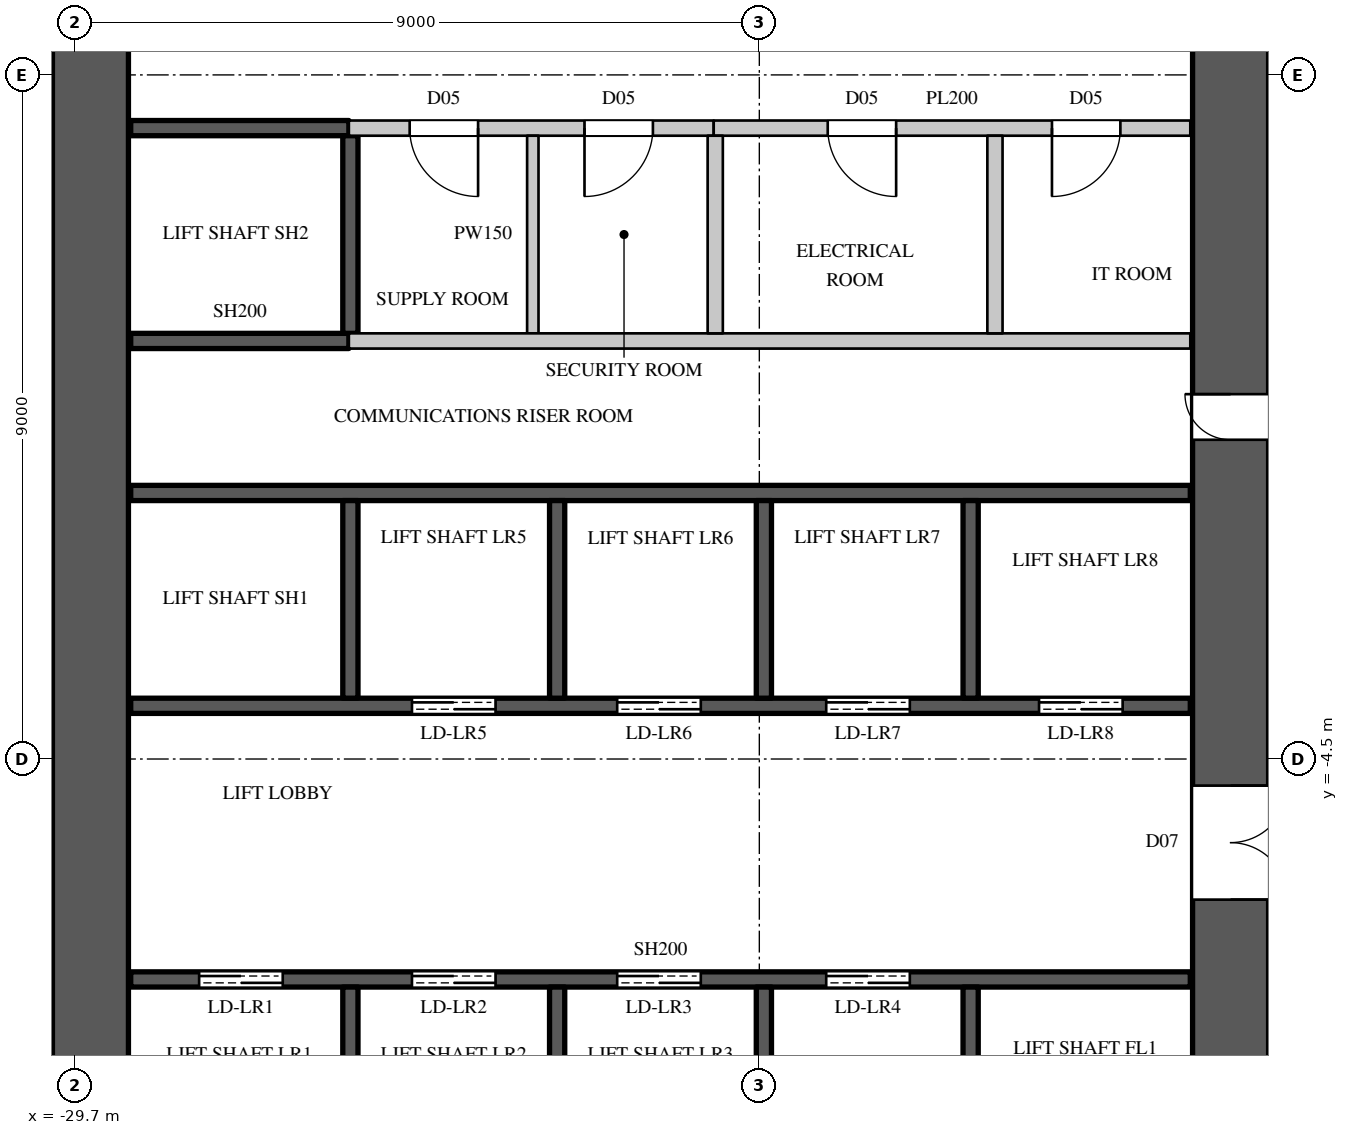
"""IFC4 building model, lengths in metres.
Left out: names, types, materials, properties, quantities, classifications, styles, units other than length and angle.
Written with IfcOpenShell. Run it as: python <this file> out.ifc"""

import sys

from ifc_helpers import new_model, si_unit, direction, frame, frame_2d, origin, place, context, subcontext, project, spatial, rectangle, extrude, element, fill, save


model = new_model("IFC4")
c1 = context("Model", 3, precision=1e-05, world=origin(), true_north=direction((0.0, 1.0)))
c2 = subcontext(c1, "Body", "Model", "MODEL_VIEW")
j1 = project(units=[si_unit("LENGTHUNIT", "METRE"), si_unit("PLANEANGLEUNIT", "RADIAN")], contexts=[c1])
p1 = place(None, origin())
s1 = spatial("IfcSite", under=j1, at=p1, CompositionType="ELEMENT")
p2 = place(p1, origin())
s2 = spatial("IfcBuilding", under=s1, at=p2, CompositionType="ELEMENT")
p3 = place(p2, frame((0.0, 0.0, 127.5)))
s3 = spatial("IfcBuildingStorey", under=s2, at=p3, CompositionType="ELEMENT", Elevation=127.5)
p4 = place(p3, frame((-14.5, -14.8, 0.0), z_axis=(0.0, 0.0, 1.0), x_axis=(0.0, 1.0, 0.0)))
e1 = element("IfcWall", 1, at=p4, inside=s3, PredefinedType="SHEAR", context=c2, shape_type="SweptSolid", body=[
    extrude(rectangle(XDim=29.6, YDim=1.0, at=frame_2d((14.8, 0.0))), origin(), (0.0, 0.0, 1.0), 3.6),
])
p5 = place(p4, frame((8.45, 0.0, 0.0)))
e2 = element("IfcOpeningElement", 2, at=p5, cuts=e1, PredefinedType="OPENING", context=c2, shape_type="SweptSolid", body=[
    extrude(rectangle(XDim=1.5, YDim=2.4, at=frame_2d((0.75, 1.2))), frame((0.0, 0.51, 0.0), z_axis=(0.0, -1.0, 0.0), x_axis=(1.0, 0.0, 0.0)), (0.0, 0.0, 1.0), 1.02),
])
p6 = place(p4, frame((19.65, 0.0, 0.0)))
e3 = element("IfcOpeningElement", 3, at=p6, cuts=e1, PredefinedType="OPENING", context=c2, shape_type="SweptSolid", body=[
    extrude(rectangle(XDim=1.5, YDim=2.4, at=frame_2d((0.75, 1.2))), frame((0.0, 0.51, 0.0), z_axis=(0.0, -1.0, 0.0), x_axis=(1.0, 0.0, 0.0)), (0.0, 0.0, 1.0), 1.02),
])
p7 = place(p4, frame((14.5, 0.0, 0.0)))
e4 = element("IfcOpeningElement", 4, at=p7, cuts=e1, PredefinedType="OPENING", context=c2, shape_type="SweptSolid", body=[
    extrude(rectangle(XDim=0.6, YDim=2.0, at=frame_2d((0.3, 1.0))), frame((0.0, 0.51, 0.0), z_axis=(0.0, -1.0, 0.0), x_axis=(1.0, 0.0, 0.0)), (0.0, 0.0, 1.0), 1.02),
])
p8 = place(p3, frame((-29.5, -10.2, 0.0), z_axis=(0.0, 0.0, 1.0), x_axis=(0.0, 1.0, 0.0)))
e5 = element("IfcWall", 5, at=p8, inside=s3, PredefinedType="SHEAR", context=c2, shape_type="SweptSolid", body=[
    extrude(rectangle(XDim=20.4, YDim=1.0, at=frame_2d((10.2, 0.0))), origin(), (0.0, 0.0, 1.0), 3.6),
])
p9 = place(p3, frame((-26.1, 3.8, 0.0), z_axis=(0.0, 0.0, 1.0), x_axis=(1.0, 0.0, 0.0)))
e6 = element("IfcWall", 6, at=p9, inside=s3, PredefinedType="PARTITIONING", context=c2, shape_type="SweptSolid", body=[
    extrude(rectangle(XDim=4.8, YDim=0.2, at=frame_2d((2.4, 0.0))), origin(), (0.0, 0.0, 1.0), 3.3),
])
p10 = place(p9, frame((0.8, 0.0, 0.0)))
e7 = element("IfcOpeningElement", 7, at=p10, cuts=e6, PredefinedType="OPENING", context=c2, shape_type="SweptSolid", body=[
    extrude(rectangle(XDim=0.9, YDim=2.2, at=frame_2d((0.45, 1.1))), frame((0.0, 0.11, 0.0), z_axis=(0.0, -1.0, 0.0), x_axis=(1.0, 0.0, 0.0)), (0.0, 0.0, 1.0), 0.22),
])
p11 = place(p9, frame((3.1, 0.0, 0.0)))
e8 = element("IfcOpeningElement", 8, at=p11, cuts=e6, PredefinedType="OPENING", context=c2, shape_type="SweptSolid", body=[
    extrude(rectangle(XDim=0.9, YDim=2.2, at=frame_2d((0.45, 1.1))), frame((0.0, 0.11, 0.0), z_axis=(0.0, -1.0, 0.0), x_axis=(1.0, 0.0, 0.0)), (0.0, 0.0, 1.0), 0.22),
])
p12 = place(p3, frame((-23.68, 1.1, 0.0), z_axis=(0.0, 0.0, 1.0), x_axis=(0.0, 1.0, 0.0)))
e9 = element("IfcWall", 9, at=p12, inside=s3, PredefinedType="PARTITIONING", context=c2, shape_type="SweptSolid", body=[
    extrude(rectangle(XDim=2.6, YDim=0.15, at=frame_2d((1.3, 0.0))), origin(), (0.0, 0.0, 1.0), 3.3),
])
p13 = place(p3, frame((-26.1, 1.0, 0.0), z_axis=(0.0, 0.0, 1.0), x_axis=(1.0, 0.0, 0.0)))
e10 = element("IfcWall", 10, at=p13, inside=s3, PredefinedType="PARTITIONING", context=c2, shape_type="SweptSolid", body=[
    extrude(rectangle(XDim=11.07, YDim=0.2, at=frame_2d((5.535, 0.0))), origin(), (0.0, 0.0, 1.0), 3.3),
])
p14 = place(p3, frame((-21.3, 3.8, 0.0), z_axis=(0.0, 0.0, 1.0), x_axis=(1.0, 0.0, 0.0)))
e11 = element("IfcWall", 11, at=p14, inside=s3, PredefinedType="PARTITIONING", context=c2, shape_type="SweptSolid", body=[
    extrude(rectangle(XDim=6.27, YDim=0.2, at=frame_2d((3.135, 0.0))), origin(), (0.0, 0.0, 1.0), 3.3),
])
p15 = place(p14, frame((1.5, 0.0, 0.0)))
e12 = element("IfcOpeningElement", 12, at=p15, cuts=e11, PredefinedType="OPENING", context=c2, shape_type="SweptSolid", body=[
    extrude(rectangle(XDim=0.9, YDim=2.2, at=frame_2d((0.45, 1.1))), frame((0.0, 0.11, 0.0), z_axis=(0.0, -1.0, 0.0), x_axis=(1.0, 0.0, 0.0)), (0.0, 0.0, 1.0), 0.22),
])
p16 = place(p14, frame((4.45, 0.0, 0.0)))
e13 = element("IfcOpeningElement", 13, at=p16, cuts=e11, PredefinedType="OPENING", context=c2, shape_type="SweptSolid", body=[
    extrude(rectangle(XDim=0.9, YDim=2.2, at=frame_2d((0.45, 1.1))), frame((0.0, 0.11, 0.0), z_axis=(0.0, -1.0, 0.0), x_axis=(1.0, 0.0, 0.0)), (0.0, 0.0, 1.0), 0.22),
])
for number, where, z_axis, x_axis in (
    (14, (-21.28, 1.1, 0.0), (0.0, 0.0, 1.0), (0.0, 1.0, 0.0)),
    (15, (-17.6, 1.1, 0.0), (0.0, 0.0, 1.0), (0.0, 1.0, 0.0)),
):
    element("IfcWall", number, at=place(p3, frame(where, z_axis=z_axis, x_axis=x_axis)), inside=s3, PredefinedType="PARTITIONING", context=c2, shape_type="SweptSolid", body=[
        extrude(rectangle(XDim=2.6, YDim=0.2, at=frame_2d((1.3, 0.0))), origin(), (0.0, 0.0, 1.0), 3.3),
    ])
p17 = place(p3, frame((-28.97, -7.4, 0.0), z_axis=(0.0, 0.0, 1.0), x_axis=(1.0, 0.0, 0.0)))
e16 = element("IfcWall", 16, at=p17, inside=s3, PredefinedType="SHEAR", context=c2, shape_type="SweptSolid", body=[
    extrude(rectangle(XDim=13.94, YDim=0.2, at=frame_2d((6.97, 0.0))), origin(), (0.0, 0.0, 1.0), 3.3),
])
p18 = place(p17, frame((0.9, 0.0, 0.0)))
e17 = element("IfcOpeningElement", 17, at=p18, cuts=e16, PredefinedType="OPENING", context=c2, shape_type="SweptSolid", body=[
    extrude(rectangle(XDim=1.1, YDim=2.2, at=frame_2d((0.55, 1.1))), frame((0.0, 0.11, 0.0), z_axis=(0.0, -1.0, 0.0), x_axis=(1.0, 0.0, 0.0)), (0.0, 0.0, 1.0), 0.22),
])
p19 = place(p17, frame((3.7, 0.0, 0.0)))
e18 = element("IfcOpeningElement", 18, at=p19, cuts=e16, PredefinedType="OPENING", context=c2, shape_type="SweptSolid", body=[
    extrude(rectangle(XDim=1.1, YDim=2.2, at=frame_2d((0.55, 1.1))), frame((0.0, 0.11, 0.0), z_axis=(0.0, -1.0, 0.0), x_axis=(1.0, 0.0, 0.0)), (0.0, 0.0, 1.0), 0.22),
])
p20 = place(p17, frame((6.4, 0.0, 0.0)))
e19 = element("IfcOpeningElement", 19, at=p20, cuts=e16, PredefinedType="OPENING", context=c2, shape_type="SweptSolid", body=[
    extrude(rectangle(XDim=1.1, YDim=2.2, at=frame_2d((0.55, 1.1))), frame((0.0, 0.11, 0.0), z_axis=(0.0, -1.0, 0.0), x_axis=(1.0, 0.0, 0.0)), (0.0, 0.0, 1.0), 0.22),
])
p21 = place(p17, frame((9.15, 0.0, 0.0)))
e20 = element("IfcOpeningElement", 20, at=p21, cuts=e16, PredefinedType="OPENING", context=c2, shape_type="SweptSolid", body=[
    extrude(rectangle(XDim=1.1, YDim=2.2, at=frame_2d((0.55, 1.1))), frame((0.0, 0.11, 0.0), z_axis=(0.0, -1.0, 0.0), x_axis=(1.0, 0.0, 0.0)), (0.0, 0.0, 1.0), 0.22),
])
p22 = place(p3, frame((-28.97, -3.8, 0.0), z_axis=(0.0, 0.0, 1.0), x_axis=(1.0, 0.0, 0.0)))
e21 = element("IfcWall", 21, at=p22, inside=s3, PredefinedType="SHEAR", context=c2, shape_type="SweptSolid", body=[
    extrude(rectangle(XDim=13.94, YDim=0.2, at=frame_2d((6.97, 0.0))), origin(), (0.0, 0.0, 1.0), 3.3),
])
p23 = place(p22, frame((3.7, 0.0, 0.0)))
e22 = element("IfcOpeningElement", 22, at=p23, cuts=e21, PredefinedType="OPENING", context=c2, shape_type="SweptSolid", body=[
    extrude(rectangle(XDim=1.1, YDim=2.2, at=frame_2d((0.55, 1.1))), frame((0.0, 0.11, 0.0), z_axis=(0.0, -1.0, 0.0), x_axis=(1.0, 0.0, 0.0)), (0.0, 0.0, 1.0), 0.22),
])
p24 = place(p22, frame((6.4, 0.0, 0.0)))
e23 = element("IfcOpeningElement", 23, at=p24, cuts=e21, PredefinedType="OPENING", context=c2, shape_type="SweptSolid", body=[
    extrude(rectangle(XDim=1.1, YDim=2.2, at=frame_2d((0.55, 1.1))), frame((0.0, 0.11, 0.0), z_axis=(0.0, -1.0, 0.0), x_axis=(1.0, 0.0, 0.0)), (0.0, 0.0, 1.0), 0.22),
])
p25 = place(p22, frame((9.15, 0.0, 0.0)))
e24 = element("IfcOpeningElement", 24, at=p25, cuts=e21, PredefinedType="OPENING", context=c2, shape_type="SweptSolid", body=[
    extrude(rectangle(XDim=1.1, YDim=2.2, at=frame_2d((0.55, 1.1))), frame((0.0, 0.11, 0.0), z_axis=(0.0, -1.0, 0.0), x_axis=(1.0, 0.0, 0.0)), (0.0, 0.0, 1.0), 0.22),
])
p26 = place(p22, frame((11.95, 0.0, 0.0)))
e25 = element("IfcOpeningElement", 25, at=p26, cuts=e21, PredefinedType="OPENING", context=c2, shape_type="SweptSolid", body=[
    extrude(rectangle(XDim=1.1, YDim=2.2, at=frame_2d((0.55, 1.1))), frame((0.0, 0.11, 0.0), z_axis=(0.0, -1.0, 0.0), x_axis=(1.0, 0.0, 0.0)), (0.0, 0.0, 1.0), 0.22),
])
p27 = place(p3, frame((-28.97, -1.0, 0.0), z_axis=(0.0, 0.0, 1.0), x_axis=(1.0, 0.0, 0.0)))
e26 = element("IfcWall", 26, at=p27, inside=s3, PredefinedType="SHEAR", context=c2, shape_type="SweptSolid", body=[
    extrude(rectangle(XDim=13.94, YDim=0.2, at=frame_2d((6.97, 0.0))), origin(), (0.0, 0.0, 1.0), 3.3),
])
for number, where, z_axis, x_axis in (
    (27, (-28.97, 1.0, 0.0), (0.0, 0.0, 1.0), (1.0, 0.0, 0.0)),
    (28, (-28.97, 3.8, 0.0), (0.0, 0.0, 1.0), (1.0, 0.0, 0.0)),
):
    element("IfcWall", number, at=place(p3, frame(where, z_axis=z_axis, x_axis=x_axis)), inside=s3, PredefinedType="SHEAR", context=c2, shape_type="SweptSolid", body=[
        extrude(rectangle(XDim=2.87, YDim=0.2, at=frame_2d((1.435, 0.0))), origin(), (0.0, 0.0, 1.0), 3.3),
    ])
p28 = place(p3, frame((-26.08, -10.075, 0.0), z_axis=(0.0, 0.0, 1.0), x_axis=(0.0, 1.0, 0.0)))
e29 = element("IfcWall", 29, at=p28, inside=s3, PredefinedType="SHEAR", context=c2, shape_type="SweptSolid", body=[
    extrude(rectangle(XDim=2.575, YDim=0.2, at=frame_2d((1.288, 0.0))), origin(), (0.0, 0.0, 1.0), 3.6),
])
p29 = place(p3, frame((-26.08, -3.7, 0.0), z_axis=(0.0, 0.0, 1.0), x_axis=(0.0, 1.0, 0.0)))
e30 = element("IfcWall", 30, at=p29, inside=s3, PredefinedType="SHEAR", context=c2, shape_type="SweptSolid", body=[
    extrude(rectangle(XDim=2.6, YDim=0.2, at=frame_2d((1.3, 0.0))), origin(), (0.0, 0.0, 1.0), 3.6),
])
p30 = place(p3, frame((-26.08, 1.1, 0.0), z_axis=(0.0, 0.0, 1.0), x_axis=(0.0, 1.0, 0.0)))
e31 = element("IfcWall", 31, at=p30, inside=s3, PredefinedType="SHEAR", context=c2, shape_type="SweptSolid", body=[
    extrude(rectangle(XDim=2.6, YDim=0.2, at=frame_2d((1.3, 0.0))), origin(), (0.0, 0.0, 1.0), 3.3),
])
p31 = place(p3, frame((-23.36, -10.075, 0.0), z_axis=(0.0, 0.0, 1.0), x_axis=(0.0, 1.0, 0.0)))
e32 = element("IfcWall", 32, at=p31, inside=s3, PredefinedType="SHEAR", context=c2, shape_type="SweptSolid", body=[
    extrude(rectangle(XDim=2.575, YDim=0.2, at=frame_2d((1.288, 0.0))), origin(), (0.0, 0.0, 1.0), 3.6),
])
p32 = place(p3, frame((-23.36, -3.7, 0.0), z_axis=(0.0, 0.0, 1.0), x_axis=(0.0, 1.0, 0.0)))
e33 = element("IfcWall", 33, at=p32, inside=s3, PredefinedType="SHEAR", context=c2, shape_type="SweptSolid", body=[
    extrude(rectangle(XDim=2.6, YDim=0.2, at=frame_2d((1.3, 0.0))), origin(), (0.0, 0.0, 1.0), 3.6),
])
p33 = place(p3, frame((-20.64, -10.075, 0.0), z_axis=(0.0, 0.0, 1.0), x_axis=(0.0, 1.0, 0.0)))
e34 = element("IfcWall", 34, at=p33, inside=s3, PredefinedType="SHEAR", context=c2, shape_type="SweptSolid", body=[
    extrude(rectangle(XDim=2.575, YDim=0.2, at=frame_2d((1.288, 0.0))), origin(), (0.0, 0.0, 1.0), 3.6),
])
p34 = place(p3, frame((-20.64, -3.7, 0.0), z_axis=(0.0, 0.0, 1.0), x_axis=(0.0, 1.0, 0.0)))
e35 = element("IfcWall", 35, at=p34, inside=s3, PredefinedType="SHEAR", context=c2, shape_type="SweptSolid", body=[
    extrude(rectangle(XDim=2.6, YDim=0.2, at=frame_2d((1.3, 0.0))), origin(), (0.0, 0.0, 1.0), 3.6),
])
p35 = place(p3, frame((-17.92, -10.1, 0.0), z_axis=(0.0, 0.0, 1.0), x_axis=(0.0, 1.0, 0.0)))
e36 = element("IfcWall", 36, at=p35, inside=s3, PredefinedType="SHEAR", context=c2, shape_type="SweptSolid", body=[
    extrude(rectangle(XDim=2.6, YDim=0.2, at=frame_2d((1.3, 0.0))), origin(), (0.0, 0.0, 1.0), 3.6),
])
p36 = place(p3, frame((-17.92, -3.7, 0.0), z_axis=(0.0, 0.0, 1.0), x_axis=(0.0, 1.0, 0.0)))
e37 = element("IfcWall", 37, at=p36, inside=s3, PredefinedType="SHEAR", context=c2, shape_type="SweptSolid", body=[
    extrude(rectangle(XDim=2.6, YDim=0.2, at=frame_2d((1.3, 0.0))), origin(), (0.0, 0.0, 1.0), 3.6),
])
p37 = place(p10, origin())
e38 = element("IfcDoor", 38, at=p37, inside=s3, OperationType="SINGLE_SWING_LEFT", PredefinedType="DOOR", context=c2, shape_type="SweptSolid", body=[
    extrude(rectangle(XDim=0.9, YDim=2.2, at=frame_2d((0.45, 1.1))), frame((0.0, 0.025, 0.0), z_axis=(0.0, -1.0, 0.0), x_axis=(1.0, 0.0, 0.0)), (0.0, 0.0, 1.0), 0.05),
])
fill(e7, e38)
p38 = place(p11, origin())
e39 = element("IfcDoor", 39, at=p38, inside=s3, OperationType="SINGLE_SWING_RIGHT", PredefinedType="DOOR", context=c2, shape_type="SweptSolid", body=[
    extrude(rectangle(XDim=0.9, YDim=2.2, at=frame_2d((0.45, 1.1))), frame((0.0, 0.025, 0.0), z_axis=(0.0, -1.0, 0.0), x_axis=(1.0, 0.0, 0.0)), (0.0, 0.0, 1.0), 0.05),
])
fill(e8, e39)
p39 = place(p15, origin())
e40 = element("IfcDoor", 40, at=p39, inside=s3, OperationType="SINGLE_SWING_LEFT", PredefinedType="DOOR", context=c2, shape_type="SweptSolid", body=[
    extrude(rectangle(XDim=0.9, YDim=2.2, at=frame_2d((0.45, 1.1))), frame((0.0, 0.025, 0.0), z_axis=(0.0, -1.0, 0.0), x_axis=(1.0, 0.0, 0.0)), (0.0, 0.0, 1.0), 0.05),
])
fill(e12, e40)
p40 = place(p16, origin())
e41 = element("IfcDoor", 41, at=p40, inside=s3, OperationType="SINGLE_SWING_RIGHT", PredefinedType="DOOR", context=c2, shape_type="SweptSolid", body=[
    extrude(rectangle(XDim=0.9, YDim=2.2, at=frame_2d((0.45, 1.1))), frame((0.0, 0.025, 0.0), z_axis=(0.0, -1.0, 0.0), x_axis=(1.0, 0.0, 0.0)), (0.0, 0.0, 1.0), 0.05),
])
fill(e13, e41)
p41 = place(p18, origin())
e42 = element("IfcDoor", 42, at=p41, inside=s3, OperationType="DOUBLE_DOOR_SLIDING", PredefinedType="DOOR", context=c2, shape_type="SweptSolid", body=[
    extrude(rectangle(XDim=1.1, YDim=2.2, at=frame_2d((0.55, 1.1))), frame((0.0, 0.025, 0.0), z_axis=(0.0, -1.0, 0.0), x_axis=(1.0, 0.0, 0.0)), (0.0, 0.0, 1.0), 0.05),
])
fill(e17, e42)
p42 = place(p19, origin())
e43 = element("IfcDoor", 43, at=p42, inside=s3, OperationType="DOUBLE_DOOR_SLIDING", PredefinedType="DOOR", context=c2, shape_type="SweptSolid", body=[
    extrude(rectangle(XDim=1.1, YDim=2.2, at=frame_2d((0.55, 1.1))), frame((0.0, 0.025, 0.0), z_axis=(0.0, -1.0, 0.0), x_axis=(1.0, 0.0, 0.0)), (0.0, 0.0, 1.0), 0.05),
])
fill(e18, e43)
p43 = place(p20, origin())
e44 = element("IfcDoor", 44, at=p43, inside=s3, OperationType="DOUBLE_DOOR_SLIDING", PredefinedType="DOOR", context=c2, shape_type="SweptSolid", body=[
    extrude(rectangle(XDim=1.1, YDim=2.2, at=frame_2d((0.55, 1.1))), frame((0.0, 0.025, 0.0), z_axis=(0.0, -1.0, 0.0), x_axis=(1.0, 0.0, 0.0)), (0.0, 0.0, 1.0), 0.05),
])
fill(e19, e44)
p44 = place(p21, origin())
e45 = element("IfcDoor", 45, at=p44, inside=s3, OperationType="DOUBLE_DOOR_SLIDING", PredefinedType="DOOR", context=c2, shape_type="SweptSolid", body=[
    extrude(rectangle(XDim=1.1, YDim=2.2, at=frame_2d((0.55, 1.1))), frame((0.0, 0.025, 0.0), z_axis=(0.0, -1.0, 0.0), x_axis=(1.0, 0.0, 0.0)), (0.0, 0.0, 1.0), 0.05),
])
fill(e20, e45)
p45 = place(p23, origin())
e46 = element("IfcDoor", 46, at=p45, inside=s3, OperationType="DOUBLE_DOOR_SLIDING", PredefinedType="DOOR", context=c2, shape_type="SweptSolid", body=[
    extrude(rectangle(XDim=1.1, YDim=2.2, at=frame_2d((0.55, 1.1))), frame((0.0, 0.025, 0.0), z_axis=(0.0, -1.0, 0.0), x_axis=(1.0, 0.0, 0.0)), (0.0, 0.0, 1.0), 0.05),
])
fill(e22, e46)
p46 = place(p24, origin())
e47 = element("IfcDoor", 47, at=p46, inside=s3, OperationType="DOUBLE_DOOR_SLIDING", PredefinedType="DOOR", context=c2, shape_type="SweptSolid", body=[
    extrude(rectangle(XDim=1.1, YDim=2.2, at=frame_2d((0.55, 1.1))), frame((0.0, 0.025, 0.0), z_axis=(0.0, -1.0, 0.0), x_axis=(1.0, 0.0, 0.0)), (0.0, 0.0, 1.0), 0.05),
])
fill(e23, e47)
p47 = place(p25, origin())
e48 = element("IfcDoor", 48, at=p47, inside=s3, OperationType="DOUBLE_DOOR_SLIDING", PredefinedType="DOOR", context=c2, shape_type="SweptSolid", body=[
    extrude(rectangle(XDim=1.1, YDim=2.2, at=frame_2d((0.55, 1.1))), frame((0.0, 0.025, 0.0), z_axis=(0.0, -1.0, 0.0), x_axis=(1.0, 0.0, 0.0)), (0.0, 0.0, 1.0), 0.05),
])
fill(e24, e48)
p48 = place(p26, origin())
e49 = element("IfcDoor", 49, at=p48, inside=s3, OperationType="DOUBLE_DOOR_SLIDING", PredefinedType="DOOR", context=c2, shape_type="SweptSolid", body=[
    extrude(rectangle(XDim=1.1, YDim=2.2, at=frame_2d((0.55, 1.1))), frame((0.0, 0.025, 0.0), z_axis=(0.0, -1.0, 0.0), x_axis=(1.0, 0.0, 0.0)), (0.0, 0.0, 1.0), 0.05),
])
fill(e25, e49)
p49 = place(p5, origin())
e50 = element("IfcDoor", 50, at=p49, inside=s3, OperationType="DOUBLE_DOOR_SINGLE_SWING", PredefinedType="DOOR", context=c2, shape_type="SweptSolid", body=[
    extrude(rectangle(XDim=1.5, YDim=2.4, at=frame_2d((0.75, 1.2))), frame((0.0, -0.445, 0.0), z_axis=(0.0, -1.0, 0.0), x_axis=(1.0, 0.0, 0.0)), (0.0, 0.0, 1.0), 0.05),
])
fill(e2, e50)
p50 = place(p7, origin())
e51 = element("IfcDoor", 51, at=p50, inside=s3, OperationType="SINGLE_SWING_RIGHT", PredefinedType="DOOR", context=c2, shape_type="SweptSolid", body=[
    extrude(rectangle(XDim=0.6, YDim=2.0, at=frame_2d((0.3, 1.0))), frame((0.0, 0.495, 0.0), z_axis=(0.0, -1.0, 0.0), x_axis=(1.0, 0.0, 0.0)), (0.0, 0.0, 1.0), 0.05),
])
fill(e4, e51)
save(model, sys.argv[1])
